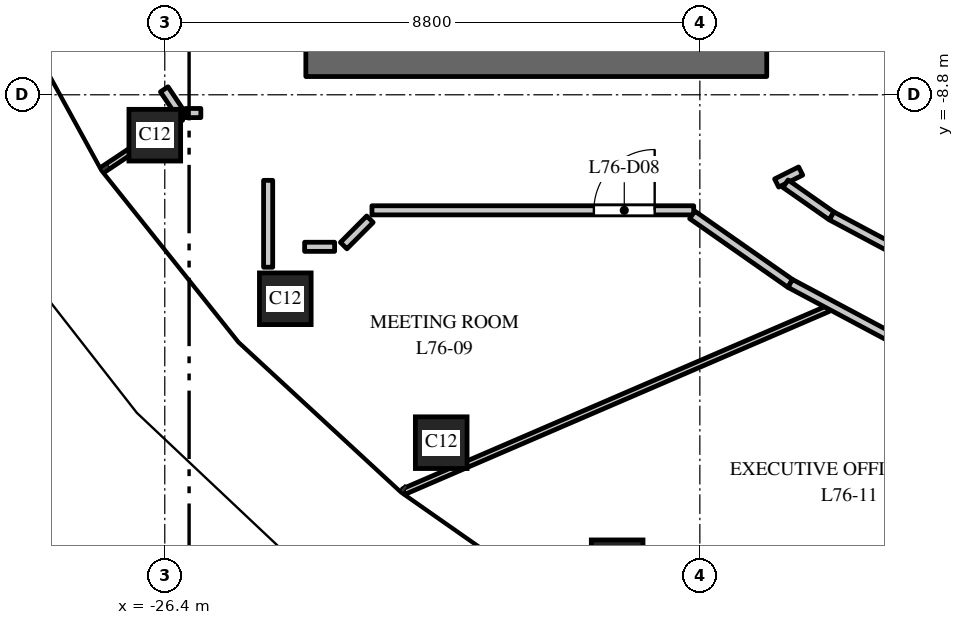
"""IFC4 building model, lengths in metres.
Left out: names, types, materials, properties, quantities, classifications, styles, units other than length and angle.
Written with IfcOpenShell. Run it as: python <this file> out.ifc"""

import sys

from ifc_helpers import new_model, si_unit, direction, frame, frame_2d, origin, origin_2d, place, context, subcontext, project, spatial, rectangle, extrude, element, fill, save


model = new_model("IFC4")
c1 = context("Model", 3, precision=1e-05, world=origin(), true_north=direction((0.0, 1.0)))
c2 = subcontext(c1, "Body", "Model", "MODEL_VIEW")
j1 = project(units=[si_unit("LENGTHUNIT", "METRE"), si_unit("PLANEANGLEUNIT", "RADIAN")], contexts=[c1])
p1 = place(None, origin())
s1 = spatial("IfcSite", under=j1, at=p1, CompositionType="ELEMENT")
p2 = place(p1, origin())
s2 = spatial("IfcBuilding", under=s1, at=p2, CompositionType="ELEMENT")
p3 = place(p2, frame((0.0, 0.0, 347.0)))
s3 = spatial("IfcBuildingStorey", under=s2, at=p3, CompositionType="ELEMENT", Elevation=347.0)
p4 = place(p3, frame((-26.564, -9.464, 0.021), z_axis=(0.491879634407, 0.247568905736, 0.834723943689), x_axis=(-0.449578736033, 0.893240706701, 0.0)))
e1 = element("IfcColumn", 1, at=p4, inside=s3, PredefinedType="COLUMN", context=c2, shape_type="SweptSolid", body=[
    extrude(rectangle(XDim=0.85, YDim=0.85, at=origin_2d()), origin(), (0.0, 0.0, 1.0), 4.646),
])
p5 = place(p3, frame((-24.418, -12.154, 0.021), z_axis=(0.450739713419, 0.316171343674, 0.834787034031), x_axis=(-0.574258734761, 0.81867387008, 0.0)))
e2 = element("IfcColumn", 2, at=p5, inside=s3, PredefinedType="COLUMN", context=c2, shape_type="SweptSolid", body=[
    extrude(rectangle(XDim=0.85, YDim=0.85, at=origin_2d()), origin(), (0.0, 0.0, 1.0), 4.744),
])
p6 = place(p3, frame((-21.854, -14.521, 0.021), z_axis=(0.402285560679, 0.375879123876, 0.834794113481), x_axis=(-0.682718667605, 0.730681340192, 0.0)))
e3 = element("IfcColumn", 3, at=p6, inside=s3, PredefinedType="COLUMN", context=c2, shape_type="SweptSolid", body=[
    extrude(rectangle(XDim=0.85, YDim=0.85, at=origin_2d()), origin(), (0.0, 0.0, 1.0), 4.734),
])
p7 = place(p3, frame((-18.96, -16.545, 0.021), z_axis=(0.348267486207, 0.426502607868, 0.834748634939), x_axis=(-0.774570364405, 0.632487747379, 0.0)))
e4 = element("IfcColumn", 4, at=p7, inside=s3, PredefinedType="COLUMN", context=c2, shape_type="SweptSolid", body=[
    extrude(rectangle(XDim=0.85, YDim=0.85, at=origin_2d()), origin(), (0.0, 0.0, 1.0), 4.734),
])
p8 = place(p3, frame((-15.813, -18.223, 0.021), z_axis=(0.28996437072, 0.468233413861, 0.834672471007), x_axis=(-0.850179331562, 0.526493213807, 0.0)))
e5 = element("IfcColumn", 5, at=p8, inside=s3, PredefinedType="COLUMN", context=c2, shape_type="SweptSolid", body=[
    extrude(rectangle(XDim=0.85, YDim=0.85, at=origin_2d()), origin(), (0.0, 0.0, 1.0), 4.734),
])
p9 = place(p3, frame((-16.5, -8.25, 0.0), z_axis=(0.0, 0.0, 1.0), x_axis=(-1.0, 0.0, 0.0)))
e6 = element("IfcWall", 6, at=p9, inside=s3, PredefinedType="SHEAR", context=c2, shape_type="SweptSolid", body=[
    extrude(rectangle(XDim=7.58, YDim=0.5, at=frame_2d((3.79, 0.0))), origin(), (0.0, 0.0, 1.0), 3.7),
])
p10 = place(p3, frame((-27.412, -10.027, 0.0), z_axis=(0.0, 0.0, 1.0), x_axis=(0.832245757536, 0.554406889445, 0.0)))
e7 = element("IfcWall", 7, at=p10, inside=s3, PredefinedType="PARTITIONING", context=c2, shape_type="SweptSolid", body=[
    extrude(rectangle(XDim=1.537, YDim=0.1, at=frame_2d((0.769, 0.0))), origin(), (0.0, 0.0, 1.0), 3.7),
])
p11 = place(p3, frame((-26.409, -8.71, 0.0), z_axis=(0.0, 0.0, 1.0), x_axis=(0.555907960912, -0.8312438505, 0.0)))
e8 = element("IfcWall", 8, at=p11, inside=s3, PredefinedType="PARTITIONING", context=c2, shape_type="SweptSolid", body=[
    extrude(rectangle(XDim=0.56, YDim=0.15, at=frame_2d((0.28, 0.0))), origin(), (0.0, 0.0, 1.0), 3.7),
])
p12 = place(p3, frame((-26.058, -9.1, 0.0), z_axis=(0.0, 0.0, 1.0), x_axis=(1.0, 0.0, 0.0)))
e9 = element("IfcWall", 9, at=p12, inside=s3, PredefinedType="PARTITIONING", context=c2, shape_type="SweptSolid", body=[
    extrude(rectangle(XDim=0.251, YDim=0.15, at=frame_2d((0.125, 0.0))), origin(), (0.0, 0.0, 1.0), 3.7),
])
p13 = place(p3, frame((-24.7, -11.636, 0.0), z_axis=(0.0, 0.0, 1.0), x_axis=(0.0, 1.0, 0.0)))
e10 = element("IfcWall", 10, at=p13, inside=s3, PredefinedType="PARTITIONING", context=c2, shape_type="SweptSolid", body=[
    extrude(rectangle(XDim=1.429, YDim=0.15, at=frame_2d((0.714, 0.0))), origin(), (0.0, 0.0, 1.0), 3.7),
])
p14 = place(p3, frame((-24.1, -11.3, 0.0), z_axis=(0.0, 0.0, 1.0), x_axis=(1.0, 0.0, 0.0)))
e11 = element("IfcWall", 11, at=p14, inside=s3, PredefinedType="PARTITIONING", context=c2, shape_type="SweptSolid", body=[
    extrude(rectangle(XDim=0.493, YDim=0.15, at=frame_2d((0.247, 0.0))), origin(), (0.0, 0.0, 1.0), 3.7),
])
p15 = place(p3, frame((-22.993, -10.7, 0.0), z_axis=(0.0, 0.0, 1.0), x_axis=(1.0, 0.0, 0.0)))
e12 = element("IfcWall", 12, at=p15, inside=s3, PredefinedType="PARTITIONING", context=c2, shape_type="SweptSolid", body=[
    extrude(rectangle(XDim=5.292, YDim=0.15, at=frame_2d((2.646, 0.0))), origin(), (0.0, 0.0, 1.0), 3.0),
])
p16 = place(p15, frame((3.65, 0.0, 0.0)))
e13 = element("IfcOpeningElement", 13, at=p16, cuts=e12, PredefinedType="OPENING", context=c2, shape_type="SweptSolid", body=[
    extrude(rectangle(XDim=1.0, YDim=2.1, at=frame_2d((0.5, 1.05))), frame((0.0, 0.085, 0.0), z_axis=(0.0, -1.0, 0.0), x_axis=(1.0, 0.0, 0.0)), (0.0, 0.0, 1.0), 0.17),
])
p17 = place(p3, frame((-22.47, -15.325, 0.0), z_axis=(0.0, 0.0, 1.0), x_axis=(0.918328517553, 0.39581906706, 0.0)))
e14 = element("IfcWall", 14, at=p17, inside=s3, PredefinedType="PARTITIONING", context=c2, shape_type="SweptSolid", body=[
    extrude(rectangle(XDim=7.596, YDim=0.1, at=frame_2d((3.798, 0.0))), origin(), (0.0, 0.0, 1.0), 3.0),
])
p18 = place(p3, frame((-17.725, -10.775, 0.0), z_axis=(0.0, 0.0, 1.0), x_axis=(0.819366063165, -0.573270664288, 0.0)))
e15 = element("IfcWall", 15, at=p18, inside=s3, PredefinedType="PARTITIONING", context=c2, shape_type="SweptSolid", body=[
    extrude(rectangle(XDim=1.966, YDim=0.15, at=frame_2d((0.983, 0.0))), origin(), (0.0, 0.0, 1.0), 2.95),
])
p19 = place(p3, frame((-16.337, -10.251, 0.0), z_axis=(0.0, 0.0, 1.0), x_axis=(0.894869210213, 0.446328462696, 0.0)))
e16 = element("IfcWall", 16, at=p19, inside=s3, PredefinedType="PARTITIONING", context=c2, shape_type="SweptSolid", body=[
    extrude(rectangle(XDim=0.441, YDim=0.15, at=frame_2d((0.221, 0.0))), origin(), (0.0, 0.0, 1.0), 3.7),
])
p20 = place(p3, frame((-16.191, -10.262, 0.0), z_axis=(0.0, 0.0, 1.0), x_axis=(0.819455106519, -0.573143375081, 0.0)))
e17 = element("IfcWall", 17, at=p20, inside=s3, PredefinedType="PARTITIONING", context=c2, shape_type="SweptSolid", body=[
    extrude(rectangle(XDim=0.925, YDim=0.15, at=frame_2d((0.462, 0.0))), origin(), (0.0, 0.0, 1.0), 2.95),
])
p21 = place(p3, frame((-16.114, -11.902, 0.0), z_axis=(0.0, 0.0, 1.0), x_axis=(0.882371338396, -0.470553738883, 0.0)))
e18 = element("IfcWall", 18, at=p21, inside=s3, PredefinedType="PARTITIONING", context=c2, shape_type="SweptSolid", body=[
    extrude(rectangle(XDim=2.939, YDim=0.15, at=frame_2d((1.469, 0.0))), origin(), (0.0, 0.0, 1.0), 3.7),
])
p22 = place(p3, frame((-15.433, -10.792, 0.0), z_axis=(0.0, 0.0, 1.0), x_axis=(0.882445003112, -0.470415578487, 0.0)))
e19 = element("IfcWall", 19, at=p22, inside=s3, PredefinedType="PARTITIONING", context=c2, shape_type="SweptSolid", body=[
    extrude(rectangle(XDim=2.789, YDim=0.15, at=frame_2d((1.395, 0.0))), origin(), (0.0, 0.0, 1.0), 3.7),
])
p23 = place(p3, frame((-23.026, -10.846, 0.0), z_axis=(0.0, 0.0, 1.0), x_axis=(-0.70551060944, -0.708699357957, 0.0)))
e20 = element("IfcWall", 20, at=p23, inside=s3, PredefinedType="PARTITIONING", context=c2, shape_type="SweptSolid", body=[
    extrude(rectangle(XDim=0.613, YDim=0.15, at=frame_2d((0.306, 0.0))), origin(), (0.0, 0.0, 1.0), 3.7),
])
p24 = place(p16, origin())
e21 = element("IfcDoor", 21, at=p24, inside=s3, OperationType="SINGLE_SWING_RIGHT", PredefinedType="DOOR", context=c2, shape_type="SweptSolid", body=[
    extrude(rectangle(XDim=1.0, YDim=2.1, at=frame_2d((0.5, 1.05))), frame((0.0, 0.025, 0.0), z_axis=(0.0, -1.0, 0.0), x_axis=(1.0, 0.0, 0.0)), (0.0, 0.0, 1.0), 0.05),
])
fill(e13, e21)
save(model, sys.argv[1])
